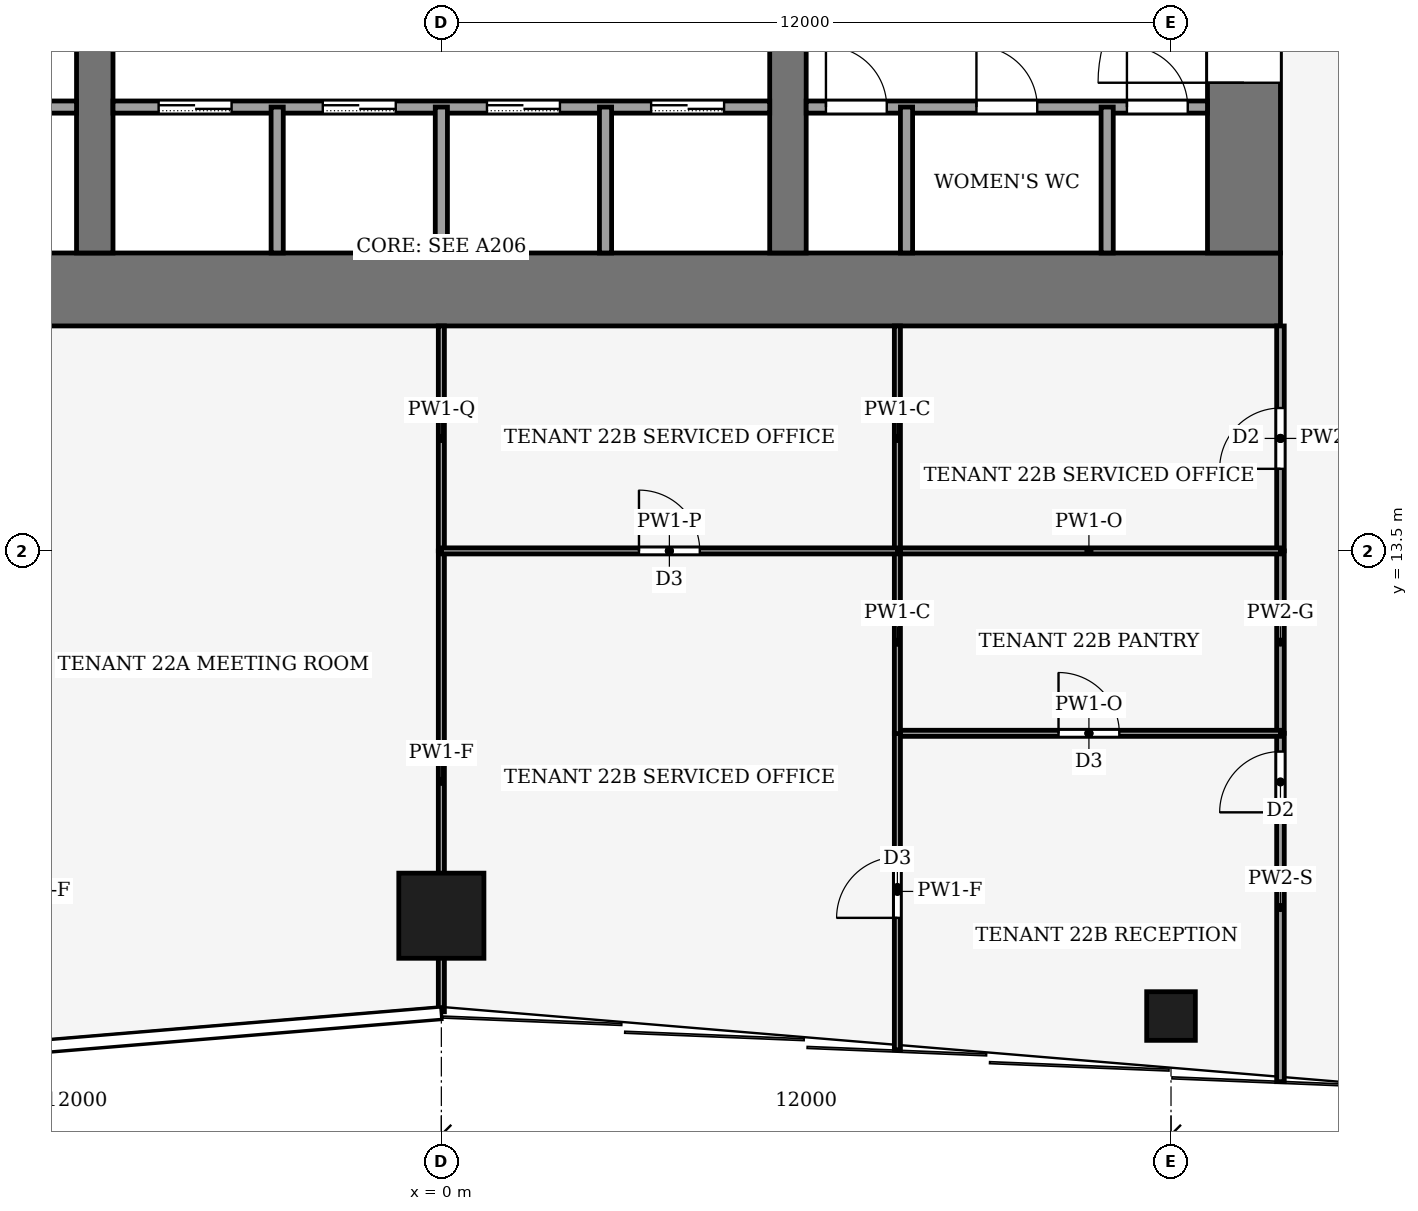
"""IFC4 building model, lengths in metres.
Left out: names, types, materials, properties, quantities, classifications, styles, units other than length and angle.
Written with IfcOpenShell. Run it as: python <this file> out.ifc"""

import sys

from ifc_helpers import new_model, si_unit, direction, frame, frame_2d, origin, origin_2d, place, context, subcontext, project, spatial, rectangle, hollow_rectangle, extrude, element, fill, save


model = new_model("IFC4")
c1 = context("Model", 3, precision=1e-05, world=origin(), true_north=direction((0.0, 1.0)))
c2 = subcontext(c1, "Body", "Model", "MODEL_VIEW")
j1 = project(units=[si_unit("LENGTHUNIT", "METRE"), si_unit("PLANEANGLEUNIT", "RADIAN")], contexts=[c1])
p1 = place(None, origin())
s1 = spatial("IfcSite", under=j1, at=p1, CompositionType="ELEMENT")
p2 = place(p1, origin())
s2 = spatial("IfcBuilding", under=s1, at=p2, CompositionType="ELEMENT")
p3 = place(p2, frame((0.0, 0.0, 98.0)))
s3 = spatial("IfcBuildingStorey", under=s2, at=p3, CompositionType="ELEMENT", Elevation=98.0)
p4 = place(p3, frame((-13.8, 17.8, -0.13), z_axis=(0.0, 0.0, 1.0), x_axis=(1.0, 0.0, 0.0)))
e1 = element("IfcWall", 1, at=p4, inside=s3, PredefinedType="SHEAR", context=c2, shape_type="SweptSolid", body=[
    extrude(rectangle(XDim=27.6, YDim=1.2, at=frame_2d((13.8, 0.0))), origin(), (0.0, 0.0, 1.0), 4.0),
])
p5 = place(p3, frame((13.2, 18.4, -0.13), z_axis=(0.0, 0.0, 1.0), x_axis=(0.0, 1.0, 0.0)))
e2 = element("IfcWall", 2, at=p5, inside=s3, PredefinedType="SHEAR", context=c2, shape_type="SweptSolid", body=[
    extrude(rectangle(XDim=19.2, YDim=1.2, at=frame_2d((9.6, 0.0))), origin(), (0.0, 0.0, 1.0), 4.0),
])
p6 = place(p5, frame((2.8, 0.0, 0.13)))
e3 = element("IfcOpeningElement", 3, at=p6, cuts=e2, PredefinedType="OPENING", context=c2, shape_type="SweptSolid", body=[
    extrude(rectangle(XDim=2.4, YDim=2.4, at=frame_2d((1.2, 1.2))), frame((0.0, 0.61, 0.0), z_axis=(0.0, -1.0, 0.0), x_axis=(1.0, 0.0, 0.0)), (0.0, 0.0, 1.0), 1.22),
])
p7 = place(p5, frame((13.3, 0.0, 0.13)))
e4 = element("IfcOpeningElement", 4, at=p7, cuts=e2, PredefinedType="OPENING", context=c2, shape_type="SweptSolid", body=[
    extrude(rectangle(XDim=2.4, YDim=2.4, at=frame_2d((1.2, 1.2))), frame((0.0, 0.61, 0.0), z_axis=(0.0, -1.0, 0.0), x_axis=(1.0, 0.0, 0.0)), (0.0, 0.0, 1.0), 1.22),
])
p8 = place(p3, frame((-5.7, 18.4, -0.13), z_axis=(0.0, 0.0, 1.0), x_axis=(0.0, 1.0, 0.0)))
e5 = element("IfcWall", 5, at=p8, inside=s3, PredefinedType="SHEAR", context=c2, shape_type="SweptSolid", body=[
    extrude(rectangle(XDim=19.2, YDim=0.6, at=frame_2d((9.6, 0.0))), origin(), (0.0, 0.0, 1.0), 4.0),
])
p9 = place(p8, frame((8.35, 0.0, 0.13)))
e6 = element("IfcOpeningElement", 6, at=p9, cuts=e5, PredefinedType="OPENING", context=c2, shape_type="SweptSolid", body=[
    extrude(rectangle(XDim=0.9, YDim=2.1, at=frame_2d((0.45, 1.05))), frame((0.0, 0.31, 0.0), z_axis=(0.0, -1.0, 0.0), x_axis=(1.0, 0.0, 0.0)), (0.0, 0.0, 1.0), 0.62),
])
p10 = place(p3, frame((5.7, 18.4, -0.13), z_axis=(0.0, 0.0, 1.0), x_axis=(0.0, 1.0, 0.0)))
e7 = element("IfcWall", 7, at=p10, inside=s3, PredefinedType="SHEAR", context=c2, shape_type="SweptSolid", body=[
    extrude(rectangle(XDim=19.2, YDim=0.6, at=frame_2d((9.6, 0.0))), origin(), (0.0, 0.0, 1.0), 4.0),
])
p11 = place(p10, frame((13.3, 0.0, 0.13)))
e8 = element("IfcOpeningElement", 8, at=p11, cuts=e7, PredefinedType="OPENING", context=c2, shape_type="SweptSolid", body=[
    extrude(rectangle(XDim=2.4, YDim=2.4, at=frame_2d((1.2, 1.2))), frame((0.0, 0.31, 0.0), z_axis=(0.0, -1.0, 0.0), x_axis=(1.0, 0.0, 0.0)), (0.0, 0.0, 1.0), 0.62),
])
p12 = place(p3, frame((0.0, 7.5, 0.0), z_axis=(0.0, 0.0, 1.0), x_axis=(1.0, 0.0, 0.0)))
e9 = element("IfcColumn", 9, at=p12, inside=s3, PredefinedType="COLUMN", context=c2, shape_type="SweptSolid", body=[
    extrude(hollow_rectangle(XDim=1.4, YDim=1.4, WallThickness=0.08, at=origin_2d()), origin(), (0.0, 0.0, 1.0), 4.0),
])
p13 = place(p3, frame((12.0, 5.85, 0.0), z_axis=(0.0, 0.0, 1.0), x_axis=(1.0, 0.0, 0.0)))
e10 = element("IfcColumn", 10, at=p13, inside=s3, PredefinedType="COLUMN", context=c2, shape_type="SweptSolid", body=[
    extrude(hollow_rectangle(XDim=0.8, YDim=0.8, WallThickness=0.04, at=origin_2d()), origin(), (0.0, 0.0, 1.0), 4.0),
])
p14 = place(p3, frame((-12.6, 20.8, 0.0), z_axis=(0.0, 0.0, 1.0), x_axis=(1.0, 0.0, 0.0)))
e11 = element("IfcWall", 11, at=p14, inside=s3, PredefinedType="PARTITIONING", context=c2, shape_type="SweptSolid", body=[
    extrude(rectangle(XDim=6.6, YDim=0.2, at=frame_2d((3.3, 0.0))), origin(), (0.0, 0.0, 1.0), 3.87),
])
p15 = place(p14, frame((2.8, 0.0, 0.0)))
e12 = element("IfcOpeningElement", 12, at=p15, cuts=e11, PredefinedType="OPENING", context=c2, shape_type="SweptSolid", body=[
    extrude(rectangle(XDim=1.0, YDim=2.1, at=frame_2d((0.5, 1.05))), frame((0.0, 0.11, 0.0), z_axis=(0.0, -1.0, 0.0), x_axis=(1.0, 0.0, 0.0)), (0.0, 0.0, 1.0), 0.22),
])
p16 = place(p3, frame((-5.4, 20.8, 0.0), z_axis=(0.0, 0.0, 1.0), x_axis=(1.0, 0.0, 0.0)))
e13 = element("IfcWall", 13, at=p16, inside=s3, PredefinedType="PARTITIONING", context=c2, shape_type="SweptSolid", body=[
    extrude(rectangle(XDim=10.8, YDim=0.2, at=frame_2d((5.4, 0.0))), origin(), (0.0, 0.0, 1.0), 3.87),
])
p17 = place(p16, frame((0.75, 0.0, 0.0)))
e14 = element("IfcOpeningElement", 14, at=p17, cuts=e13, PredefinedType="OPENING", context=c2, shape_type="SweptSolid", body=[
    extrude(rectangle(XDim=1.2, YDim=2.2, at=frame_2d((0.6, 1.1))), frame((0.0, 0.11, 0.0), z_axis=(0.0, -1.0, 0.0), x_axis=(1.0, 0.0, 0.0)), (0.0, 0.0, 1.0), 0.22),
])
p18 = place(p16, frame((3.45, 0.0, 0.0)))
e15 = element("IfcOpeningElement", 15, at=p18, cuts=e13, PredefinedType="OPENING", context=c2, shape_type="SweptSolid", body=[
    extrude(rectangle(XDim=1.2, YDim=2.2, at=frame_2d((0.6, 1.1))), frame((0.0, 0.11, 0.0), z_axis=(0.0, -1.0, 0.0), x_axis=(1.0, 0.0, 0.0)), (0.0, 0.0, 1.0), 0.22),
])
p19 = place(p16, frame((6.15, 0.0, 0.0)))
e16 = element("IfcOpeningElement", 16, at=p19, cuts=e13, PredefinedType="OPENING", context=c2, shape_type="SweptSolid", body=[
    extrude(rectangle(XDim=1.2, YDim=2.2, at=frame_2d((0.6, 1.1))), frame((0.0, 0.11, 0.0), z_axis=(0.0, -1.0, 0.0), x_axis=(1.0, 0.0, 0.0)), (0.0, 0.0, 1.0), 0.22),
])
p20 = place(p16, frame((8.85, 0.0, 0.0)))
e17 = element("IfcOpeningElement", 17, at=p20, cuts=e13, PredefinedType="OPENING", context=c2, shape_type="SweptSolid", body=[
    extrude(rectangle(XDim=1.2, YDim=2.2, at=frame_2d((0.6, 1.1))), frame((0.0, 0.11, 0.0), z_axis=(0.0, -1.0, 0.0), x_axis=(1.0, 0.0, 0.0)), (0.0, 0.0, 1.0), 0.22),
])
p21 = place(p3, frame((6.0, 20.8, 0.0), z_axis=(0.0, 0.0, 1.0), x_axis=(1.0, 0.0, 0.0)))
e18 = element("IfcWall", 18, at=p21, inside=s3, PredefinedType="PARTITIONING", context=c2, shape_type="SweptSolid", body=[
    extrude(rectangle(XDim=6.6, YDim=0.2, at=frame_2d((3.3, 0.0))), origin(), (0.0, 0.0, 1.0), 3.87),
])
p22 = place(p21, frame((0.325, 0.0, 0.0)))
e19 = element("IfcOpeningElement", 19, at=p22, cuts=e18, PredefinedType="OPENING", context=c2, shape_type="SweptSolid", body=[
    extrude(rectangle(XDim=1.0, YDim=2.1, at=frame_2d((0.5, 1.05))), frame((0.0, 0.11, 0.0), z_axis=(0.0, -1.0, 0.0), x_axis=(1.0, 0.0, 0.0)), (0.0, 0.0, 1.0), 0.22),
])
p23 = place(p21, frame((2.8, 0.0, 0.0)))
e20 = element("IfcOpeningElement", 20, at=p23, cuts=e18, PredefinedType="OPENING", context=c2, shape_type="SweptSolid", body=[
    extrude(rectangle(XDim=1.0, YDim=2.1, at=frame_2d((0.5, 1.05))), frame((0.0, 0.11, 0.0), z_axis=(0.0, -1.0, 0.0), x_axis=(1.0, 0.0, 0.0)), (0.0, 0.0, 1.0), 0.22),
])
p24 = place(p21, frame((5.275, 0.0, 0.0)))
e21 = element("IfcOpeningElement", 21, at=p24, cuts=e18, PredefinedType="OPENING", context=c2, shape_type="SweptSolid", body=[
    extrude(rectangle(XDim=1.0, YDim=2.1, at=frame_2d((0.5, 1.05))), frame((0.0, 0.11, 0.0), z_axis=(0.0, -1.0, 0.0), x_axis=(1.0, 0.0, 0.0)), (0.0, 0.0, 1.0), 0.22),
])
for number, where, z_axis, x_axis in (
    (22, (-2.7, 18.4, 0.0), (0.0, 0.0, 1.0), (0.0, 1.0, 0.0)),
    (23, (0.0, 18.4, 0.0), (0.0, 0.0, 1.0), (0.0, 1.0, 0.0)),
    (24, (2.7, 18.4, 0.0), (0.0, 0.0, 1.0), (0.0, 1.0, 0.0)),
    (25, (7.65, 18.4, 0.0), (0.0, 0.0, 1.0), (0.0, 1.0, 0.0)),
    (26, (10.95, 18.4, 0.0), (0.0, 0.0, 1.0), (0.0, 1.0, 0.0)),
):
    element("IfcWall", number, at=place(p3, frame(where, z_axis=z_axis, x_axis=x_axis)), inside=s3, PredefinedType="PARTITIONING", context=c2, shape_type="SweptSolid", body=[
        extrude(rectangle(XDim=2.4, YDim=0.2, at=frame_2d((1.2, 0.0))), origin(), (0.0, 0.0, 1.0), 3.87),
    ])
p25 = place(p3, frame((13.8, 4.77, 0.0), z_axis=(0.0, 0.0, 1.0), x_axis=(0.0, 1.0, 0.0)))
e27 = element("IfcWall", 27, at=p25, inside=s3, PredefinedType="PARTITIONING", context=c2, shape_type="SweptSolid", body=[
    extrude(rectangle(XDim=5.73, YDim=0.125, at=frame_2d((2.865, 0.0))), origin(), (0.0, 0.0, 1.0), 3.04),
])
p26 = place(p25, frame((4.43, 0.0, 0.0)))
e28 = element("IfcOpeningElement", 28, at=p26, cuts=e27, PredefinedType="OPENING", context=c2, shape_type="SweptSolid", body=[
    extrude(rectangle(XDim=1.0, YDim=2.1, at=frame_2d((0.5, 1.05))), frame((0.0, 0.073, 0.0), z_axis=(0.0, -1.0, 0.0), x_axis=(1.0, 0.0, 0.0)), (0.0, 0.0, 1.0), 0.145),
])
p27 = place(p3, frame((13.8, 13.5, 0.0), z_axis=(0.0, 0.0, 1.0), x_axis=(0.0, -1.0, 0.0)))
e29 = element("IfcWall", 29, at=p27, inside=s3, PredefinedType="PARTITIONING", context=c2, shape_type="SweptSolid", body=[
    extrude(rectangle(XDim=3.0, YDim=0.125, at=frame_2d((1.5, 0.0))), origin(), (0.0, 0.0, 1.0), 3.87),
])
p28 = place(p3, frame((13.8, 13.5, 0.0), z_axis=(0.0, 0.0, 1.0), x_axis=(0.0, 1.0, 0.0)))
e30 = element("IfcWall", 30, at=p28, inside=s3, PredefinedType="PARTITIONING", context=c2, shape_type="SweptSolid", body=[
    extrude(rectangle(XDim=3.7, YDim=0.125, at=frame_2d((1.85, 0.0))), origin(), (0.0, 0.0, 1.0), 3.14),
])
p29 = place(p28, frame((1.35, 0.0, 0.0)))
e31 = element("IfcOpeningElement", 31, at=p29, cuts=e30, PredefinedType="OPENING", context=c2, shape_type="SweptSolid", body=[
    extrude(rectangle(XDim=1.0, YDim=2.1, at=frame_2d((0.5, 1.05))), frame((0.0, 0.073, 0.0), z_axis=(0.0, -1.0, 0.0), x_axis=(1.0, 0.0, 0.0)), (0.0, 0.0, 1.0), 0.145),
])
p30 = place(p3, frame((0.0, 5.92, 0.0), z_axis=(0.0, 0.0, 1.0), x_axis=(0.0, 1.0, 0.0)))
e32 = element("IfcWall", 32, at=p30, inside=s3, PredefinedType="PARTITIONING", context=c2, shape_type="SweptSolid", body=[
    extrude(rectangle(XDim=7.58, YDim=0.1, at=frame_2d((3.79, 0.0))), origin(), (0.0, 0.0, 1.0), 3.04),
])
p31 = place(p3, frame((0.0, 13.5, 0.0), z_axis=(0.0, 0.0, 1.0), x_axis=(0.0, 1.0, 0.0)))
e33 = element("IfcWall", 33, at=p31, inside=s3, PredefinedType="PARTITIONING", context=c2, shape_type="SweptSolid", body=[
    extrude(rectangle(XDim=3.7, YDim=0.1, at=frame_2d((1.85, 0.0))), origin(), (0.0, 0.0, 1.0), 3.48),
])
p32 = place(p3, frame((7.5, 10.5, 0.0), z_axis=(0.0, 0.0, 1.0), x_axis=(1.0, 0.0, 0.0)))
e34 = element("IfcWall", 34, at=p32, inside=s3, PredefinedType="PARTITIONING", context=c2, shape_type="SweptSolid", body=[
    extrude(rectangle(XDim=6.3, YDim=0.1, at=frame_2d((3.15, 0.0))), origin(), (0.0, 0.0, 1.0), 3.39),
])
p33 = place(p32, frame((2.65, 0.0, 0.0)))
e35 = element("IfcOpeningElement", 35, at=p33, cuts=e34, PredefinedType="OPENING", context=c2, shape_type="SweptSolid", body=[
    extrude(rectangle(XDim=1.0, YDim=2.1, at=frame_2d((0.5, 1.05))), frame((0.0, 0.06, 0.0), z_axis=(0.0, -1.0, 0.0), x_axis=(1.0, 0.0, 0.0)), (0.0, 0.0, 1.0), 0.12),
])
p34 = place(p3, frame((7.5, 5.295, 0.0), z_axis=(0.0, 0.0, 1.0), x_axis=(0.0, 1.0, 0.0)))
e36 = element("IfcWall", 36, at=p34, inside=s3, PredefinedType="PARTITIONING", context=c2, shape_type="SweptSolid", body=[
    extrude(rectangle(XDim=5.209, YDim=0.1, at=frame_2d((2.604, 0.0))), origin(), (0.0, 0.0, 1.0), 3.04),
])
p35 = place(p34, frame((2.17, 0.0, 0.0)))
e37 = element("IfcOpeningElement", 37, at=p35, cuts=e36, PredefinedType="OPENING", context=c2, shape_type="SweptSolid", body=[
    extrude(rectangle(XDim=1.0, YDim=2.1, at=frame_2d((0.5, 1.05))), frame((0.0, 0.06, 0.0), z_axis=(0.0, -1.0, 0.0), x_axis=(1.0, 0.0, 0.0)), (0.0, 0.0, 1.0), 0.12),
])
p36 = place(p3, frame((13.8, 13.5, 0.0), z_axis=(0.0, 0.0, 1.0), x_axis=(-1.0, 0.0, 0.0)))
e38 = element("IfcWall", 38, at=p36, inside=s3, PredefinedType="PARTITIONING", context=c2, shape_type="SweptSolid", body=[
    extrude(rectangle(XDim=6.3, YDim=0.1, at=frame_2d((3.15, 0.0))), origin(), (0.0, 0.0, 1.0), 3.39),
])
p37 = place(p3, frame((7.5, 13.5, 0.0), z_axis=(0.0, 0.0, 1.0), x_axis=(0.0, -1.0, 0.0)))
e39 = element("IfcWall", 39, at=p37, inside=s3, PredefinedType="PARTITIONING", context=c2, shape_type="SweptSolid", body=[
    extrude(rectangle(XDim=3.004, YDim=0.1, at=frame_2d((1.502, 0.0))), origin(), (0.0, 0.0, 1.0), 3.87),
])
p38 = place(p3, frame((7.5, 17.2, 0.0), z_axis=(0.0, 0.0, 1.0), x_axis=(0.0, -1.0, 0.0)))
e40 = element("IfcWall", 40, at=p38, inside=s3, PredefinedType="PARTITIONING", context=c2, shape_type="SweptSolid", body=[
    extrude(rectangle(XDim=3.7, YDim=0.1, at=frame_2d((1.85, 0.0))), origin(), (0.0, 0.0, 1.0), 3.87),
])
p39 = place(p3, frame((0.0, 13.5, 0.0), z_axis=(0.0, 0.0, 1.0), x_axis=(1.0, 0.0, 0.0)))
e41 = element("IfcWall", 41, at=p39, inside=s3, PredefinedType="PARTITIONING", context=c2, shape_type="SweptSolid", body=[
    extrude(rectangle(XDim=7.5, YDim=0.1, at=frame_2d((3.75, 0.0))), origin(), (0.0, 0.0, 1.0), 3.44),
])
p40 = place(p39, frame((3.25, 0.0, 0.0)))
e42 = element("IfcOpeningElement", 42, at=p40, cuts=e41, PredefinedType="OPENING", context=c2, shape_type="SweptSolid", body=[
    extrude(rectangle(XDim=1.0, YDim=2.1, at=frame_2d((0.5, 1.05))), frame((0.0, 0.06, 0.0), z_axis=(0.0, -1.0, 0.0), x_axis=(1.0, 0.0, 0.0)), (0.0, 0.0, 1.0), 0.12),
])
p41 = place(p17, origin())
e43 = element("IfcDoor", 43, at=p41, inside=s3, OperationType="SLIDING_TO_LEFT", PredefinedType="DOOR", context=c2, shape_type="SweptSolid", body=[
    extrude(rectangle(XDim=1.2, YDim=2.2, at=frame_2d((0.6, 1.1))), frame((0.0, 0.025, 0.0), z_axis=(0.0, -1.0, 0.0), x_axis=(1.0, 0.0, 0.0)), (0.0, 0.0, 1.0), 0.05),
])
fill(e14, e43)
p42 = place(p18, origin())
e44 = element("IfcDoor", 44, at=p42, inside=s3, OperationType="SLIDING_TO_LEFT", PredefinedType="DOOR", context=c2, shape_type="SweptSolid", body=[
    extrude(rectangle(XDim=1.2, YDim=2.2, at=frame_2d((0.6, 1.1))), frame((0.0, 0.025, 0.0), z_axis=(0.0, -1.0, 0.0), x_axis=(1.0, 0.0, 0.0)), (0.0, 0.0, 1.0), 0.05),
])
fill(e15, e44)
p43 = place(p19, origin())
e45 = element("IfcDoor", 45, at=p43, inside=s3, OperationType="SLIDING_TO_LEFT", PredefinedType="DOOR", context=c2, shape_type="SweptSolid", body=[
    extrude(rectangle(XDim=1.2, YDim=2.2, at=frame_2d((0.6, 1.1))), frame((0.0, 0.025, 0.0), z_axis=(0.0, -1.0, 0.0), x_axis=(1.0, 0.0, 0.0)), (0.0, 0.0, 1.0), 0.05),
])
fill(e16, e45)
p44 = place(p20, origin())
e46 = element("IfcDoor", 46, at=p44, inside=s3, OperationType="SLIDING_TO_LEFT", PredefinedType="DOOR", context=c2, shape_type="SweptSolid", body=[
    extrude(rectangle(XDim=1.2, YDim=2.2, at=frame_2d((0.6, 1.1))), frame((0.0, 0.025, 0.0), z_axis=(0.0, -1.0, 0.0), x_axis=(1.0, 0.0, 0.0)), (0.0, 0.0, 1.0), 0.05),
])
fill(e17, e46)
p45 = place(p22, origin())
e47 = element("IfcDoor", 47, at=p45, inside=s3, OperationType="SINGLE_SWING_LEFT", PredefinedType="DOOR", context=c2, shape_type="SweptSolid", body=[
    extrude(rectangle(XDim=1.0, YDim=2.1, at=frame_2d((0.5, 1.05))), frame((0.0, 0.025, 0.0), z_axis=(0.0, -1.0, 0.0), x_axis=(1.0, 0.0, 0.0)), (0.0, 0.0, 1.0), 0.05),
])
fill(e19, e47)
p46 = place(p23, origin())
e48 = element("IfcDoor", 48, at=p46, inside=s3, OperationType="SINGLE_SWING_LEFT", PredefinedType="DOOR", context=c2, shape_type="SweptSolid", body=[
    extrude(rectangle(XDim=1.0, YDim=2.1, at=frame_2d((0.5, 1.05))), frame((0.0, 0.025, 0.0), z_axis=(0.0, -1.0, 0.0), x_axis=(1.0, 0.0, 0.0)), (0.0, 0.0, 1.0), 0.05),
])
fill(e20, e48)
p47 = place(p24, origin())
e49 = element("IfcDoor", 49, at=p47, inside=s3, OperationType="SINGLE_SWING_LEFT", PredefinedType="DOOR", context=c2, shape_type="SweptSolid", body=[
    extrude(rectangle(XDim=1.0, YDim=2.1, at=frame_2d((0.5, 1.05))), frame((0.0, 0.025, 0.0), z_axis=(0.0, -1.0, 0.0), x_axis=(1.0, 0.0, 0.0)), (0.0, 0.0, 1.0), 0.05),
])
fill(e21, e49)
p48 = place(p6, origin())
e50 = element("IfcDoor", 50, at=p48, inside=s3, OperationType="DOUBLE_DOOR_SINGLE_SWING", PredefinedType="DOOR", context=c2, shape_type="SweptSolid", body=[
    extrude(rectangle(XDim=2.4, YDim=2.4, at=frame_2d((1.2, 1.2))), frame((0.0, 0.025, 0.0), z_axis=(0.0, -1.0, 0.0), x_axis=(1.0, 0.0, 0.0)), (0.0, 0.0, 1.0), 0.05),
])
fill(e3, e50)
p49 = place(p26, origin())
e51 = element("IfcDoor", 51, at=p49, inside=s3, OperationType="SINGLE_SWING_RIGHT", PredefinedType="DOOR", context=c2, shape_type="SweptSolid", body=[
    extrude(rectangle(XDim=1.0, YDim=2.1, at=frame_2d((0.5, 1.05))), frame((0.0, 0.025, 0.0), z_axis=(0.0, -1.0, 0.0), x_axis=(1.0, 0.0, 0.0)), (0.0, 0.0, 1.0), 0.05),
])
fill(e28, e51)
p50 = place(p29, origin())
e52 = element("IfcDoor", 52, at=p50, inside=s3, OperationType="SINGLE_SWING_LEFT", PredefinedType="DOOR", context=c2, shape_type="SweptSolid", body=[
    extrude(rectangle(XDim=1.0, YDim=2.1, at=frame_2d((0.5, 1.05))), frame((0.0, 0.025, 0.0), z_axis=(0.0, -1.0, 0.0), x_axis=(1.0, 0.0, 0.0)), (0.0, 0.0, 1.0), 0.05),
])
fill(e31, e52)
p51 = place(p33, origin())
e53 = element("IfcDoor", 53, at=p51, inside=s3, OperationType="SINGLE_SWING_RIGHT", PredefinedType="DOOR", context=c2, shape_type="SweptSolid", body=[
    extrude(rectangle(XDim=1.0, YDim=2.1, at=frame_2d((0.5, 1.05))), frame((0.0, 0.025, 0.0), z_axis=(0.0, -1.0, 0.0), x_axis=(1.0, 0.0, 0.0)), (0.0, 0.0, 1.0), 0.05),
])
fill(e35, e53)
p52 = place(p35, origin())
e54 = element("IfcDoor", 54, at=p52, inside=s3, OperationType="SINGLE_SWING_RIGHT", PredefinedType="DOOR", context=c2, shape_type="SweptSolid", body=[
    extrude(rectangle(XDim=1.0, YDim=2.1, at=frame_2d((0.5, 1.05))), frame((0.0, 0.025, 0.0), z_axis=(0.0, -1.0, 0.0), x_axis=(1.0, 0.0, 0.0)), (0.0, 0.0, 1.0), 0.05),
])
fill(e37, e54)
p53 = place(p40, origin())
e55 = element("IfcDoor", 55, at=p53, inside=s3, OperationType="SINGLE_SWING_RIGHT", PredefinedType="DOOR", context=c2, shape_type="SweptSolid", body=[
    extrude(rectangle(XDim=1.0, YDim=2.1, at=frame_2d((0.5, 1.05))), frame((0.0, 0.025, 0.0), z_axis=(0.0, -1.0, 0.0), x_axis=(1.0, 0.0, 0.0)), (0.0, 0.0, 1.0), 0.05),
])
fill(e42, e55)
save(model, sys.argv[1])
